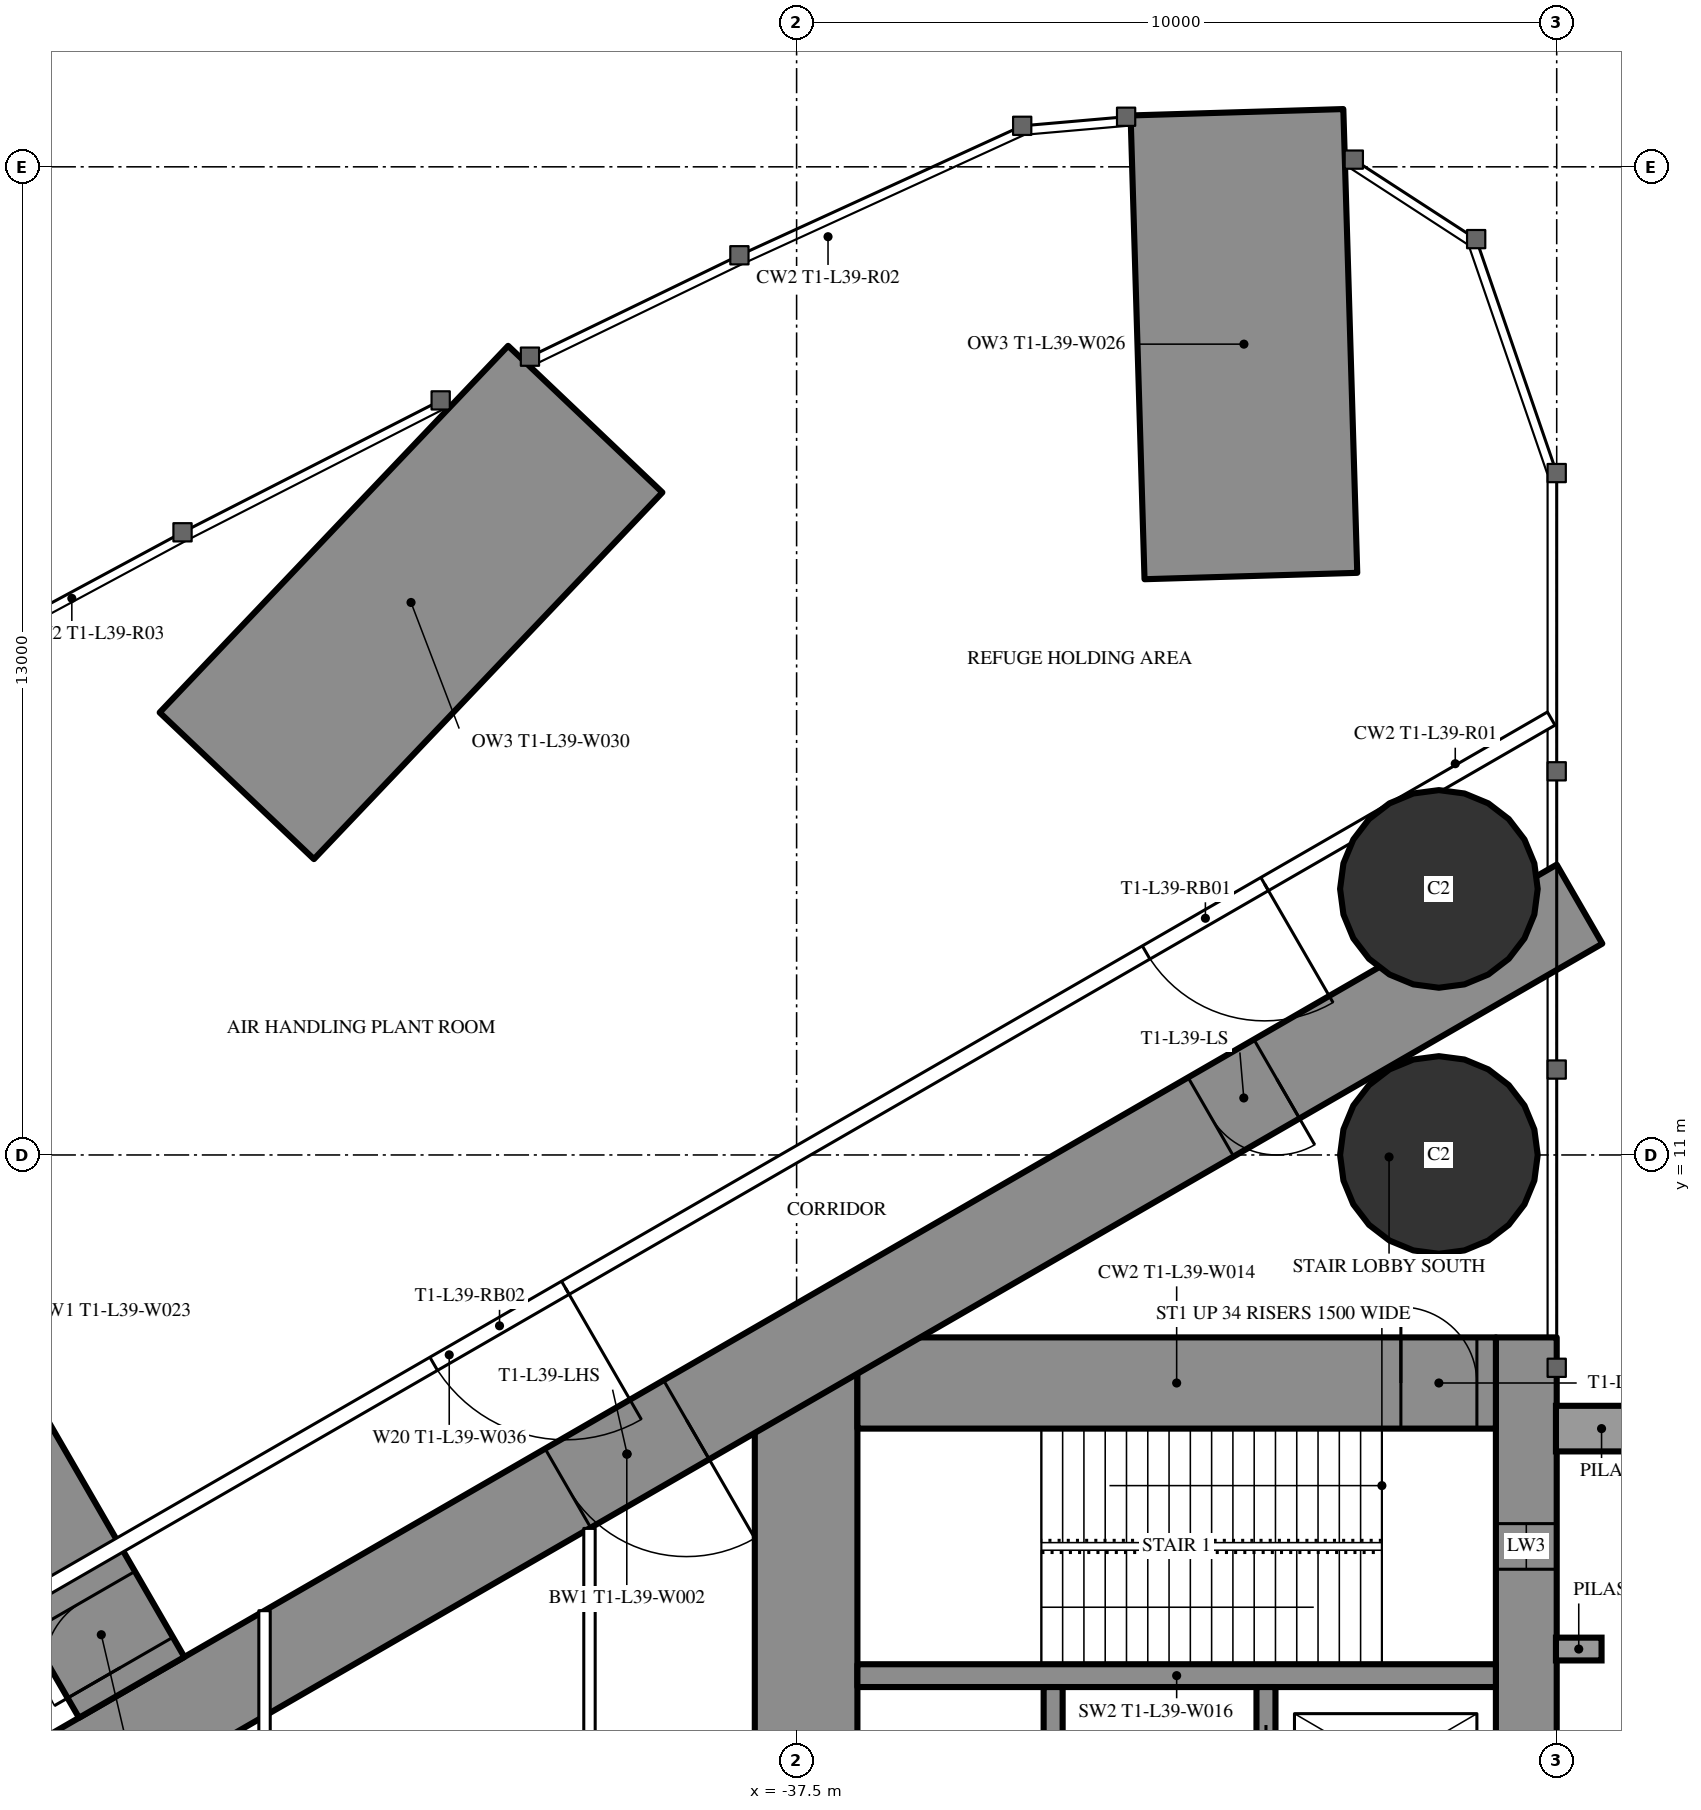
"""IFC4 building model, lengths in metres.
Left out: names, types, materials, properties, quantities, classifications, styles, units other than length and angle.
Written with IfcOpenShell. Run it as: python <this file> out.ifc"""

import sys

from ifc_helpers import new_model, si_unit, direction, frame, frame_2d, origin, origin_2d, place, context, subcontext, project, spatial, rectangle, hollow_circle, extrude, element, fill, save


model = new_model("IFC4")
c1 = context("Model", 3, precision=1e-05, world=origin(), true_north=direction((0.0, 1.0)))
c2 = subcontext(c1, "Body", "Model", "MODEL_VIEW")
j1 = project(units=[si_unit("LENGTHUNIT", "METRE"), si_unit("PLANEANGLEUNIT", "RADIAN")], contexts=[c1])
p1 = place(None, origin())
s1 = spatial("IfcSite", under=j1, at=p1, CompositionType="ELEMENT")
p2 = place(p1, origin())
s2 = spatial("IfcBuilding", under=s1, at=p2, CompositionType="ELEMENT")
p3 = place(p2, frame((0.0, 0.0, 146.7)))
s3 = spatial("IfcBuildingStorey", under=s2, at=p3, CompositionType="ELEMENT", Elevation=146.7)
p4 = place(p3, frame((-31.707, 24.718, 0.0), z_axis=(0.0, 0.0, 1.0), x_axis=(0.029997298421, -0.999549979785, 0.0)))
e1 = element("IfcWall", 1, at=p4, inside=s3, PredefinedType="SHEAR", context=c2, shape_type="SweptSolid", body=[
    extrude(rectangle(XDim=6.104, YDim=2.8, at=frame_2d((3.052, 0.0))), origin(), (0.0, 0.0, 1.0), 6.0),
])
for number, where, z_axis, x_axis in (
    (2, (-29.05, 11.0, 0.0), (0.0, 0.0, 1.0), (1.0, 0.0, 0.0)),
    (3, (-29.05, 14.5, 0.0), (0.0, 0.0, 1.0), (1.0, 0.0, 0.0)),
):
    element("IfcColumn", number, at=place(p3, frame(where, z_axis=z_axis, x_axis=x_axis)), inside=s3, PredefinedType="COLUMN", context=c2, shape_type="SweptSolid", body=[
        extrude(hollow_circle(Radius=1.3, WallThickness=0.1, at=origin_2d()), origin(), (0.0, 0.0, 1.0), 6.0),
    ])
p5 = place(p3, frame((-40.281, 20.681, 0.0), z_axis=(0.0, 0.0, 1.0), x_axis=(-0.688883466121, -0.724872106033, 0.0)))
e4 = element("IfcWall", 4, at=p5, inside=s3, PredefinedType="SHEAR", context=c2, shape_type="SweptSolid", body=[
    extrude(rectangle(XDim=6.655, YDim=2.8, at=frame_2d((3.328, 0.0))), origin(), (0.0, 0.0, 1.0), 6.0),
])
p6 = place(p3, frame((-27.9, 8.6, 0.0), z_axis=(0.0, 0.0, 1.0), x_axis=(0.0, -1.0, 0.0)))
e5 = element("IfcWall", 5, at=p6, inside=s3, PredefinedType="SHEAR", context=c2, shape_type="SweptSolid", body=[
    extrude(rectangle(XDim=17.2, YDim=0.8, at=frame_2d((8.6, 0.0))), origin(), (0.0, 0.0, 1.0), 6.0),
])
p7 = place(p6, frame((2.45, 0.0, 0.6)))
e6 = element("IfcOpeningElement", 6, at=p7, cuts=e5, PredefinedType="OPENING", context=c2, shape_type="SweptSolid", body=[
    extrude(rectangle(XDim=0.6, YDim=4.5, at=frame_2d((0.3, 2.25))), frame((0.0, 0.41, 0.0), z_axis=(0.0, -1.0, 0.0), x_axis=(1.0, 0.0, 0.0)), (0.0, 0.0, 1.0), 0.82),
])
p8 = place(p6, frame((14.15, 0.0, 0.6)))
e7 = element("IfcOpeningElement", 7, at=p8, cuts=e5, PredefinedType="OPENING", context=c2, shape_type="SweptSolid", body=[
    extrude(rectangle(XDim=0.6, YDim=4.5, at=frame_2d((0.3, 2.25))), frame((0.0, 0.41, 0.0), z_axis=(0.0, -1.0, 0.0), x_axis=(1.0, 0.0, 0.0)), (0.0, 0.0, 1.0), 0.82),
])
p9 = place(p3, frame((-37.375, 8.6, 0.0), z_axis=(0.0, 0.0, 1.0), x_axis=(0.0, -1.0, 0.0)))
e8 = element("IfcWall", 8, at=p9, inside=s3, PredefinedType="SHEAR", context=c2, shape_type="SweptSolid", body=[
    extrude(rectangle(XDim=17.2, YDim=1.35, at=frame_2d((8.6, 0.0))), origin(), (0.0, 0.0, 1.0), 6.0),
])
p10 = place(p9, frame((7.7, 0.0, 0.0)))
e9 = element("IfcOpeningElement", 9, at=p10, cuts=e8, PredefinedType="OPENING", context=c2, shape_type="SweptSolid", body=[
    extrude(rectangle(XDim=1.8, YDim=2.2, at=frame_2d((0.9, 1.1))), frame((0.0, 0.685, 0.0), z_axis=(0.0, -1.0, 0.0), x_axis=(1.0, 0.0, 0.0)), (0.0, 0.0, 1.0), 1.37),
])
p11 = place(p3, frame((-28.3, 8.0, 0.0), z_axis=(0.0, 0.0, 1.0), x_axis=(-1.0, 0.0, 0.0)))
e10 = element("IfcWall", 10, at=p11, inside=s3, PredefinedType="SHEAR", context=c2, shape_type="SweptSolid", body=[
    extrude(rectangle(XDim=8.4, YDim=1.2, at=frame_2d((4.2, 0.0))), origin(), (0.0, 0.0, 1.0), 6.0),
])
p12 = place(p11, frame((0.25, 0.0, 0.0)))
e11 = element("IfcOpeningElement", 11, at=p12, cuts=e10, PredefinedType="OPENING", context=c2, shape_type="SweptSolid", body=[
    extrude(rectangle(XDim=1.0, YDim=2.2, at=frame_2d((0.5, 1.1))), frame((0.0, 0.61, 0.0), z_axis=(0.0, -1.0, 0.0), x_axis=(1.0, 0.0, 0.0)), (0.0, 0.0, 1.0), 1.22),
])
p13 = place(p3, frame((-28.3, 4.15, 0.0), z_axis=(0.0, 0.0, 1.0), x_axis=(-1.0, 0.0, 0.0)))
e12 = element("IfcWall", 12, at=p13, inside=s3, PredefinedType="SHEAR", context=c2, shape_type="SweptSolid", body=[
    extrude(rectangle(XDim=8.4, YDim=0.3, at=frame_2d((4.2, 0.0))), origin(), (0.0, 0.0, 1.0), 6.0),
])
p14 = place(p3, frame((-31.325, 4.0, 0.0), z_axis=(0.0, 0.0, 1.0), x_axis=(0.0, -1.0, 0.0)))
e13 = element("IfcWall", 13, at=p14, inside=s3, PredefinedType="SHEAR", context=c2, shape_type="SweptSolid", body=[
    extrude(rectangle(XDim=2.1, YDim=0.25, at=frame_2d((1.05, 0.0))), origin(), (0.0, 0.0, 1.0), 6.0),
])
p15 = place(p14, frame((0.5, 0.0, 0.0)))
e14 = element("IfcOpeningElement", 14, at=p15, cuts=e13, PredefinedType="OPENING", context=c2, shape_type="SweptSolid", body=[
    extrude(rectangle(XDim=1.1, YDim=2.2, at=frame_2d((0.55, 1.1))), frame((0.0, 0.135, 0.0), z_axis=(0.0, -1.0, 0.0), x_axis=(1.0, 0.0, 0.0)), (0.0, 0.0, 1.0), 0.27),
])
p16 = place(p3, frame((-34.125, 4.0, 0.0), z_axis=(0.0, 0.0, 1.0), x_axis=(0.0, -1.0, 0.0)))
e15 = element("IfcWall", 15, at=p16, inside=s3, PredefinedType="SHEAR", context=c2, shape_type="SweptSolid", body=[
    extrude(rectangle(XDim=2.35, YDim=0.25, at=frame_2d((1.175, 0.0))), origin(), (0.0, 0.0, 1.0), 6.0),
])
p17 = place(p3, frame((-27.2, 14.3, 0.0), z_axis=(0.0, 0.0, 1.0), x_axis=(-0.866026593062, -0.499997940104, 0.0)))
e16 = element("IfcWall", 16, at=p17, inside=s3, PredefinedType="SHEAR", context=c2, shape_type="SweptSolid", body=[
    extrude(rectangle(XDim=28.946, YDim=1.2, at=frame_2d((14.473, 0.0))), origin(), (0.0, 0.0, 1.0), 6.0),
])
p18 = place(p17, frame((4.6, 0.0, 0.0)))
e17 = element("IfcOpeningElement", 17, at=p18, cuts=e16, PredefinedType="OPENING", context=c2, shape_type="SweptSolid", body=[
    extrude(rectangle(XDim=1.0, YDim=2.2, at=frame_2d((0.5, 1.1))), frame((0.0, 0.61, 0.0), z_axis=(0.0, -1.0, 0.0), x_axis=(1.0, 0.0, 0.0)), (0.0, 0.0, 1.0), 1.22),
])
p19 = place(p17, frame((13.568, 0.0, 0.0)))
e18 = element("IfcOpeningElement", 18, at=p19, cuts=e16, PredefinedType="OPENING", context=c2, shape_type="SweptSolid", body=[
    extrude(rectangle(XDim=1.8, YDim=2.2, at=frame_2d((0.9, 1.1))), frame((0.0, 0.61, 0.0), z_axis=(0.0, -1.0, 0.0), x_axis=(1.0, 0.0, 0.0)), (0.0, 0.0, 1.0), 1.22),
])
p20 = place(p3, frame((-46.248, 3.996, 0.0), z_axis=(0.0, 0.0, 1.0), x_axis=(-0.499993613132, 0.866029091213, 0.0)))
e19 = element("IfcWall", 19, at=p20, inside=s3, PredefinedType="SHEAR", context=c2, shape_type="SweptSolid", body=[
    extrude(rectangle(XDim=11.431, YDim=1.6, at=frame_2d((5.715, 0.0))), origin(), (0.0, 0.0, 1.0), 6.0),
])
p21 = place(p20, frame((0.3, 0.0, 0.0)))
e20 = element("IfcOpeningElement", 20, at=p21, cuts=e19, PredefinedType="OPENING", context=c2, shape_type="SweptSolid", body=[
    extrude(rectangle(XDim=1.0, YDim=2.2, at=frame_2d((0.5, 1.1))), frame((0.0, 0.81, 0.0), z_axis=(0.0, -1.0, 0.0), x_axis=(1.0, 0.0, 0.0)), (0.0, 0.0, 1.0), 1.62),
])
p22 = place(p3, frame((-27.572, 16.741, 0.0), z_axis=(0.0, 0.0, 1.0), x_axis=(-0.866026395587, -0.499998282143, 0.0)))
e21 = element("IfcWall", 21, at=p22, inside=s3, PredefinedType="PARTITIONING", context=c2, shape_type="SweptSolid", body=[
    extrude(rectangle(XDim=33.482, YDim=0.2, at=frame_2d((16.741, 0.0))), origin(), (0.0, 0.0, 1.0), 5.75),
])
p23 = place(p22, frame((4.354, 0.0, 0.0)))
e22 = element("IfcOpeningElement", 22, at=p23, cuts=e21, PredefinedType="OPENING", context=c2, shape_type="SweptSolid", body=[
    extrude(rectangle(XDim=1.8, YDim=2.2, at=frame_2d((0.9, 1.1))), frame((0.0, 0.11, 0.0), z_axis=(0.0, -1.0, 0.0), x_axis=(1.0, 0.0, 0.0)), (0.0, 0.0, 1.0), 0.22),
])
p24 = place(p22, frame((14.977, 0.0, 0.0)))
e23 = element("IfcOpeningElement", 23, at=p24, cuts=e21, PredefinedType="OPENING", context=c2, shape_type="SweptSolid", body=[
    extrude(rectangle(XDim=2.0, YDim=2.4, at=frame_2d((1.0, 1.2))), frame((0.0, 0.11, 0.0), z_axis=(0.0, -1.0, 0.0), x_axis=(1.0, 0.0, 0.0)), (0.0, 0.0, 1.0), 0.22),
])
p25 = place(p22, frame((26.788, 0.0, 0.0)))
e24 = element("IfcOpeningElement", 24, at=p25, cuts=e21, PredefinedType="OPENING", context=c2, shape_type="SweptSolid", body=[
    extrude(rectangle(XDim=1.8, YDim=2.2, at=frame_2d((0.9, 1.1))), frame((0.0, 0.11, 0.0), z_axis=(0.0, -1.0, 0.0), x_axis=(1.0, 0.0, 0.0)), (0.0, 0.0, 1.0), 0.22),
])
p26 = place(p3, frame((-40.225, 6.087, 0.0), z_axis=(0.0, 0.0, 1.0), x_axis=(0.0, -1.0, 0.0)))
e25 = element("IfcWall", 25, at=p26, inside=s3, PredefinedType="PARTITIONING", context=c2, shape_type="SweptSolid", body=[
    extrude(rectangle(XDim=12.174, YDim=0.15, at=frame_2d((6.087, 0.0))), origin(), (0.0, 0.0, 1.0), 5.75),
])
p27 = place(p26, frame((5.187, 0.0, 0.0)))
e26 = element("IfcOpeningElement", 26, at=p27, cuts=e25, PredefinedType="OPENING", context=c2, shape_type="SweptSolid", body=[
    extrude(rectangle(XDim=1.8, YDim=2.2, at=frame_2d((0.9, 1.1))), frame((0.0, 0.085, 0.0), z_axis=(0.0, -1.0, 0.0), x_axis=(1.0, 0.0, 0.0)), (0.0, 0.0, 1.0), 0.17),
])
p28 = place(p3, frame((-44.5, 5.005, 0.0), z_axis=(0.0, 0.0, 1.0), x_axis=(0.0, -1.0, 0.0)))
e27 = element("IfcWall", 27, at=p28, inside=s3, PredefinedType="PARTITIONING", context=c2, shape_type="SweptSolid", body=[
    extrude(rectangle(XDim=10.009, YDim=0.15, at=frame_2d((5.005, 0.0))), origin(), (0.0, 0.0, 1.0), 5.75),
])
p29 = place(p28, frame((4.505, 0.0, 0.0)))
e28 = element("IfcOpeningElement", 28, at=p29, cuts=e27, PredefinedType="OPENING", context=c2, shape_type="SweptSolid", body=[
    extrude(rectangle(XDim=1.0, YDim=2.2, at=frame_2d((0.5, 1.1))), frame((0.0, 0.085, 0.0), z_axis=(0.0, -1.0, 0.0), x_axis=(1.0, 0.0, 0.0)), (0.0, 0.0, 1.0), 0.17),
])
p30 = place(p21, origin())
e29 = element("IfcDoor", 29, at=p30, inside=s3, OperationType="SINGLE_SWING_LEFT", PredefinedType="DOOR", context=c2, shape_type="SweptSolid", body=[
    extrude(rectangle(XDim=1.0, YDim=2.2, at=frame_2d((0.5, 1.1))), frame((0.0, 0.025, 0.0), z_axis=(0.0, -1.0, 0.0), x_axis=(1.0, 0.0, 0.0)), (0.0, 0.0, 1.0), 0.05),
])
fill(e20, e29)
p31 = place(p23, origin())
e30 = element("IfcDoor", 30, at=p31, inside=s3, OperationType="DOUBLE_DOOR_SINGLE_SWING", PredefinedType="DOOR", context=c2, shape_type="SweptSolid", body=[
    extrude(rectangle(XDim=1.8, YDim=2.2, at=frame_2d((0.9, 1.1))), frame((0.0, 0.025, 0.0), z_axis=(0.0, -1.0, 0.0), x_axis=(1.0, 0.0, 0.0)), (0.0, 0.0, 1.0), 0.05),
])
fill(e22, e30)
p32 = place(p24, origin())
e31 = element("IfcDoor", 31, at=p32, inside=s3, OperationType="DOUBLE_DOOR_SINGLE_SWING", PredefinedType="DOOR", context=c2, shape_type="SweptSolid", body=[
    extrude(rectangle(XDim=2.0, YDim=2.4, at=frame_2d((1.0, 1.2))), frame((0.0, 0.025, 0.0), z_axis=(0.0, -1.0, 0.0), x_axis=(1.0, 0.0, 0.0)), (0.0, 0.0, 1.0), 0.05),
])
fill(e23, e31)
p33 = place(p18, origin())
e32 = element("IfcDoor", 32, at=p33, inside=s3, OperationType="SINGLE_SWING_LEFT", PredefinedType="DOOR", context=c2, shape_type="SweptSolid", body=[
    extrude(rectangle(XDim=1.0, YDim=2.2, at=frame_2d((0.5, 1.1))), frame((0.0, 0.025, 0.0), z_axis=(0.0, -1.0, 0.0), x_axis=(1.0, 0.0, 0.0)), (0.0, 0.0, 1.0), 0.05),
])
fill(e17, e32)
p34 = place(p19, origin())
e33 = element("IfcDoor", 33, at=p34, inside=s3, OperationType="DOUBLE_DOOR_SINGLE_SWING", PredefinedType="DOOR", context=c2, shape_type="SweptSolid", body=[
    extrude(rectangle(XDim=1.8, YDim=2.2, at=frame_2d((0.9, 1.1))), frame((0.0, 0.025, 0.0), z_axis=(0.0, -1.0, 0.0), x_axis=(1.0, 0.0, 0.0)), (0.0, 0.0, 1.0), 0.05),
])
fill(e18, e33)
p35 = place(p12, origin())
e34 = element("IfcDoor", 34, at=p35, inside=s3, OperationType="SINGLE_SWING_RIGHT", PredefinedType="DOOR", context=c2, shape_type="SweptSolid", body=[
    extrude(rectangle(XDim=1.0, YDim=2.2, at=frame_2d((0.5, 1.1))), frame((0.0, 0.025, 0.0), z_axis=(0.0, -1.0, 0.0), x_axis=(1.0, 0.0, 0.0)), (0.0, 0.0, 1.0), 0.05),
])
fill(e11, e34)
p36 = place(p15, origin())
e35 = element("IfcDoor", 35, at=p36, inside=s3, OperationType="SLIDING_TO_LEFT", PredefinedType="USERDEFINED", context=c2, shape_type="SweptSolid", body=[
    extrude(rectangle(XDim=1.1, YDim=2.2, at=frame_2d((0.55, 1.1))), frame((0.0, 0.025, 0.0), z_axis=(0.0, -1.0, 0.0), x_axis=(1.0, 0.0, 0.0)), (0.0, 0.0, 1.0), 0.05),
])
fill(e14, e35)
p37 = place(p7, origin())
e36 = element("IfcWindow", 36, at=p37, inside=s3, PartitioningType="SINGLE_PANEL", PredefinedType="WINDOW", context=c2, shape_type="SweptSolid", body=[
    extrude(rectangle(XDim=0.6, YDim=4.5, at=frame_2d((0.3, 2.25))), frame((0.0, 0.03, 0.0), z_axis=(0.0, -1.0, 0.0), x_axis=(1.0, 0.0, 0.0)), (0.0, 0.0, 1.0), 0.06),
])
fill(e6, e36)
save(model, sys.argv[1])
